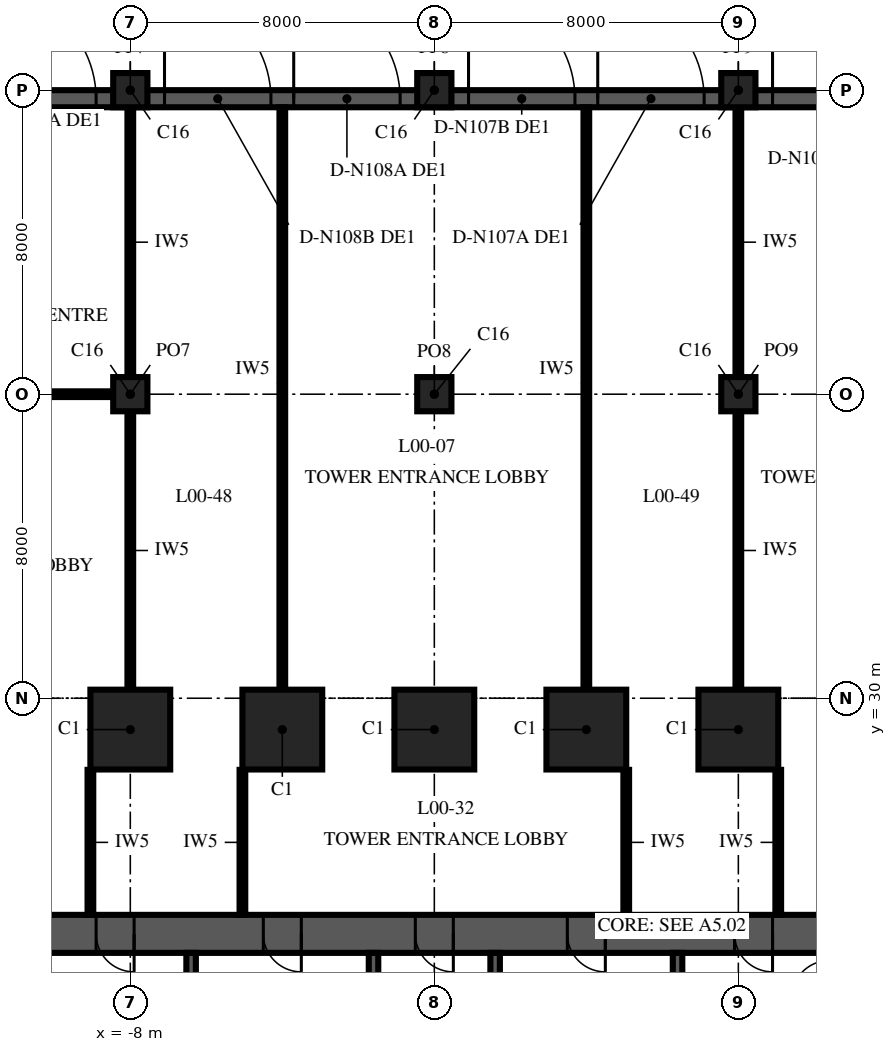
"""IFC4 building model, lengths in metres.
Left out: names, types, materials, properties, quantities, classifications, styles, units other than length and angle.
Written with IfcOpenShell. Run it as: python <this file> out.ifc"""

import sys

from ifc_helpers import new_model, si_unit, direction, frame, frame_2d, origin, origin_2d, place, context, subcontext, project, spatial, rectangle, extrude, element, fill, save


model = new_model("IFC4")
c1 = context("Model", 3, precision=1e-05, world=origin(), true_north=direction((0.0, 1.0)))
c2 = subcontext(c1, "Body", "Model", "MODEL_VIEW")
j1 = project(units=[si_unit("LENGTHUNIT", "METRE"), si_unit("PLANEANGLEUNIT", "RADIAN")], contexts=[c1])
p1 = place(None, origin())
s1 = spatial("IfcSite", under=j1, at=p1, CompositionType="ELEMENT")
p2 = place(p1, origin())
s2 = spatial("IfcBuilding", under=s1, at=p2, CompositionType="ELEMENT")
p3 = place(p2, origin())
s3 = spatial("IfcBuildingStorey", under=s2, at=p3, CompositionType="ELEMENT", Elevation=0.0)
for number, where, z_axis, x_axis in (
    (1, (8.0, 29.175, 0.0), (0.0, 0.0, 1.0), (-1.0, 0.0, 0.0)),
    (2, (4.0, 29.175, 0.0), (0.0, 0.0, 1.0), (-1.0, 0.0, 0.0)),
    (3, (0.0, 29.175, 0.0), (0.0, 0.0, 1.0), (-1.0, 0.0, 0.0)),
    (4, (-4.0, 29.175, 0.0), (0.0, 0.0, 1.0), (-1.0, 0.0, 0.0)),
    (5, (-8.0, 29.175, 0.0), (0.0, 0.0, 1.0), (-1.0, 0.0, 0.0)),
):
    element("IfcColumn", number, at=place(p3, frame(where, z_axis=z_axis, x_axis=x_axis)), inside=s3, PredefinedType="COLUMN", context=c2, shape_type="SweptSolid", body=[
        extrude(rectangle(XDim=2.1, YDim=2.1, at=origin_2d()), origin(), (0.0, 0.0, 1.0), 6.0),
    ])
for number, where, z_axis, x_axis in (
    (6, (-8.0, 38.0, 0.0), (0.0, 0.0, 1.0), (1.0, 0.0, 0.0)),
    (7, (-8.0, 46.0, 0.0), (0.0, 0.0, 1.0), (1.0, 0.0, 0.0)),
    (8, (0.0, 38.0, 0.0), (0.0, 0.0, 1.0), (1.0, 0.0, 0.0)),
    (9, (0.0, 46.0, 0.0), (0.0, 0.0, 1.0), (1.0, 0.0, 0.0)),
    (10, (8.0, 38.0, 0.0), (0.0, 0.0, 1.0), (1.0, 0.0, 0.0)),
    (11, (8.0, 46.0, 0.0), (0.0, 0.0, 1.0), (1.0, 0.0, 0.0)),
):
    element("IfcColumn", number, at=place(p3, frame(where, z_axis=z_axis, x_axis=x_axis)), inside=s3, PredefinedType="COLUMN", context=c2, shape_type="SweptSolid", body=[
        extrude(rectangle(XDim=0.9, YDim=0.9, at=origin_2d()), origin(), (0.0, 0.0, 1.0), 6.0),
    ])
p4 = place(p3, frame((13.8, 23.8, 0.0), z_axis=(0.0, 0.0, 1.0), x_axis=(-1.0, 0.0, 0.0)))
e12 = element("IfcWall", 12, at=p4, inside=s3, PredefinedType="SHEAR", context=c2, shape_type="SweptSolid", body=[
    extrude(rectangle(XDim=27.6, YDim=1.0, at=frame_2d((13.8, 0.0))), origin(), (0.0, 0.0, 1.0), 6.0),
])
p5 = place(p4, frame((21.7, 0.0, 0.0)))
e13 = element("IfcOpeningElement", 13, at=p5, cuts=e12, PredefinedType="OPENING", context=c2, shape_type="SweptSolid", body=[
    extrude(rectangle(XDim=1.0, YDim=2.1, at=frame_2d((0.5, 1.05))), frame((0.0, 0.515, 0.0), z_axis=(0.0, -1.0, 0.0), x_axis=(1.0, 0.0, 0.0)), (0.0, 0.0, 1.0), 1.03),
])
p6 = place(p4, frame((4.9, 0.0, 0.0)))
e14 = element("IfcOpeningElement", 14, at=p6, cuts=e12, PredefinedType="OPENING", context=c2, shape_type="SweptSolid", body=[
    extrude(rectangle(XDim=1.0, YDim=2.1, at=frame_2d((0.5, 1.05))), frame((0.0, 0.515, 0.0), z_axis=(0.0, -1.0, 0.0), x_axis=(1.0, 0.0, 0.0)), (0.0, 0.0, 1.0), 1.03),
])
p7 = place(p4, frame((17.3, 0.0, 0.0)))
e15 = element("IfcOpeningElement", 15, at=p7, cuts=e12, PredefinedType="OPENING", context=c2, shape_type="SweptSolid", body=[
    extrude(rectangle(XDim=1.0, YDim=2.1, at=frame_2d((0.5, 1.05))), frame((0.0, 0.515, 0.0), z_axis=(0.0, -1.0, 0.0), x_axis=(1.0, 0.0, 0.0)), (0.0, 0.0, 1.0), 1.03),
])
p8 = place(p4, frame((13.3, 0.0, 0.0)))
e16 = element("IfcOpeningElement", 16, at=p8, cuts=e12, PredefinedType="OPENING", context=c2, shape_type="SweptSolid", body=[
    extrude(rectangle(XDim=1.0, YDim=2.1, at=frame_2d((0.5, 1.05))), frame((0.0, 0.515, 0.0), z_axis=(0.0, -1.0, 0.0), x_axis=(1.0, 0.0, 0.0)), (0.0, 0.0, 1.0), 1.03),
])
p9 = place(p4, frame((9.3, 0.0, 0.0)))
e17 = element("IfcOpeningElement", 17, at=p9, cuts=e12, PredefinedType="OPENING", context=c2, shape_type="SweptSolid", body=[
    extrude(rectangle(XDim=1.0, YDim=2.1, at=frame_2d((0.5, 1.05))), frame((0.0, 0.515, 0.0), z_axis=(0.0, -1.0, 0.0), x_axis=(1.0, 0.0, 0.0)), (0.0, 0.0, 1.0), 1.03),
])
for number, where, z_axis, x_axis in (
    (18, (-6.4, 16.125, 0.0), (0.0, 0.0, 1.0), (0.0, 1.0, 0.0)),
    (19, (-1.6, 16.125, 0.0), (0.0, 0.0, 1.0), (0.0, 1.0, 0.0)),
    (20, (1.6, 16.125, 0.0), (0.0, 0.0, 1.0), (0.0, 1.0, 0.0)),
    (21, (6.4, 16.125, 0.0), (0.0, 0.0, 1.0), (0.0, 1.0, 0.0)),
):
    element("IfcWall", number, at=place(p3, frame(where, z_axis=z_axis, x_axis=x_axis)), inside=s3, PredefinedType="SHEAR", context=c2, shape_type="SweptSolid", body=[
        extrude(rectangle(XDim=7.175, YDim=0.25, at=frame_2d((3.587, 0.0))), origin(), (0.0, 0.0, 1.0), 6.0),
    ])
p10 = place(p3, frame((56.0, 45.775, 0.0), z_axis=(0.0, 0.0, 1.0), x_axis=(-1.0, 0.0, 0.0)))
e22 = element("IfcWall", 22, at=p10, inside=s3, PredefinedType="SOLIDWALL", context=c2, shape_type="SweptSolid", body=[
    extrude(rectangle(XDim=90.0, YDim=0.45, at=frame_2d((45.0, 0.0))), origin(), (0.0, 0.0, 1.0), 6.0),
])
p11 = place(p10, frame((0.9, 0.0, 0.0)))
e23 = element("IfcOpeningElement", 23, at=p11, cuts=e22, PredefinedType="OPENING", context=c2, shape_type="SweptSolid", body=[
    extrude(rectangle(XDim=2.8, YDim=2.4, at=frame_2d((1.4, 1.2))), frame((0.0, 0.24, 0.0), z_axis=(0.0, -1.0, 0.0), x_axis=(1.0, 0.0, 0.0)), (0.0, 0.0, 1.0), 0.48),
])
p12 = place(p10, frame((4.3, 0.0, 0.0)))
e24 = element("IfcOpeningElement", 24, at=p12, cuts=e22, PredefinedType="OPENING", context=c2, shape_type="SweptSolid", body=[
    extrude(rectangle(XDim=2.8, YDim=2.4, at=frame_2d((1.4, 1.2))), frame((0.0, 0.24, 0.0), z_axis=(0.0, -1.0, 0.0), x_axis=(1.0, 0.0, 0.0)), (0.0, 0.0, 1.0), 0.48),
])
p13 = place(p10, frame((8.9, 0.0, 0.0)))
e25 = element("IfcOpeningElement", 25, at=p13, cuts=e22, PredefinedType="OPENING", context=c2, shape_type="SweptSolid", body=[
    extrude(rectangle(XDim=2.8, YDim=2.4, at=frame_2d((1.4, 1.2))), frame((0.0, 0.24, 0.0), z_axis=(0.0, -1.0, 0.0), x_axis=(1.0, 0.0, 0.0)), (0.0, 0.0, 1.0), 0.48),
])
p14 = place(p10, frame((12.3, 0.0, 0.0)))
e26 = element("IfcOpeningElement", 26, at=p14, cuts=e22, PredefinedType="OPENING", context=c2, shape_type="SweptSolid", body=[
    extrude(rectangle(XDim=2.8, YDim=2.4, at=frame_2d((1.4, 1.2))), frame((0.0, 0.24, 0.0), z_axis=(0.0, -1.0, 0.0), x_axis=(1.0, 0.0, 0.0)), (0.0, 0.0, 1.0), 0.48),
])
p15 = place(p10, frame((16.9, 0.0, 0.0)))
e27 = element("IfcOpeningElement", 27, at=p15, cuts=e22, PredefinedType="OPENING", context=c2, shape_type="SweptSolid", body=[
    extrude(rectangle(XDim=2.8, YDim=2.4, at=frame_2d((1.4, 1.2))), frame((0.0, 0.24, 0.0), z_axis=(0.0, -1.0, 0.0), x_axis=(1.0, 0.0, 0.0)), (0.0, 0.0, 1.0), 0.48),
])
p16 = place(p10, frame((20.3, 0.0, 0.0)))
e28 = element("IfcOpeningElement", 28, at=p16, cuts=e22, PredefinedType="OPENING", context=c2, shape_type="SweptSolid", body=[
    extrude(rectangle(XDim=2.8, YDim=2.4, at=frame_2d((1.4, 1.2))), frame((0.0, 0.24, 0.0), z_axis=(0.0, -1.0, 0.0), x_axis=(1.0, 0.0, 0.0)), (0.0, 0.0, 1.0), 0.48),
])
p17 = place(p10, frame((24.9, 0.0, 0.0)))
e29 = element("IfcOpeningElement", 29, at=p17, cuts=e22, PredefinedType="OPENING", context=c2, shape_type="SweptSolid", body=[
    extrude(rectangle(XDim=2.8, YDim=2.4, at=frame_2d((1.4, 1.2))), frame((0.0, 0.24, 0.0), z_axis=(0.0, -1.0, 0.0), x_axis=(1.0, 0.0, 0.0)), (0.0, 0.0, 1.0), 0.48),
])
p18 = place(p10, frame((28.3, 0.0, 0.0)))
e30 = element("IfcOpeningElement", 30, at=p18, cuts=e22, PredefinedType="OPENING", context=c2, shape_type="SweptSolid", body=[
    extrude(rectangle(XDim=2.8, YDim=2.4, at=frame_2d((1.4, 1.2))), frame((0.0, 0.24, 0.0), z_axis=(0.0, -1.0, 0.0), x_axis=(1.0, 0.0, 0.0)), (0.0, 0.0, 1.0), 0.48),
])
p19 = place(p10, frame((32.9, 0.0, 0.0)))
e31 = element("IfcOpeningElement", 31, at=p19, cuts=e22, PredefinedType="OPENING", context=c2, shape_type="SweptSolid", body=[
    extrude(rectangle(XDim=2.8, YDim=2.4, at=frame_2d((1.4, 1.2))), frame((0.0, 0.24, 0.0), z_axis=(0.0, -1.0, 0.0), x_axis=(1.0, 0.0, 0.0)), (0.0, 0.0, 1.0), 0.48),
])
p20 = place(p10, frame((36.3, 0.0, 0.0)))
e32 = element("IfcOpeningElement", 32, at=p20, cuts=e22, PredefinedType="OPENING", context=c2, shape_type="SweptSolid", body=[
    extrude(rectangle(XDim=2.8, YDim=2.4, at=frame_2d((1.4, 1.2))), frame((0.0, 0.24, 0.0), z_axis=(0.0, -1.0, 0.0), x_axis=(1.0, 0.0, 0.0)), (0.0, 0.0, 1.0), 0.48),
])
p21 = place(p10, frame((40.9, 0.0, 0.0)))
e33 = element("IfcOpeningElement", 33, at=p21, cuts=e22, PredefinedType="OPENING", context=c2, shape_type="SweptSolid", body=[
    extrude(rectangle(XDim=2.8, YDim=2.4, at=frame_2d((1.4, 1.2))), frame((0.0, 0.24, 0.0), z_axis=(0.0, -1.0, 0.0), x_axis=(1.0, 0.0, 0.0)), (0.0, 0.0, 1.0), 0.48),
])
p22 = place(p10, frame((44.3, 0.0, 0.0)))
e34 = element("IfcOpeningElement", 34, at=p22, cuts=e22, PredefinedType="OPENING", context=c2, shape_type="SweptSolid", body=[
    extrude(rectangle(XDim=2.8, YDim=2.4, at=frame_2d((1.4, 1.2))), frame((0.0, 0.24, 0.0), z_axis=(0.0, -1.0, 0.0), x_axis=(1.0, 0.0, 0.0)), (0.0, 0.0, 1.0), 0.48),
])
p23 = place(p10, frame((48.9, 0.0, 0.0)))
e35 = element("IfcOpeningElement", 35, at=p23, cuts=e22, PredefinedType="OPENING", context=c2, shape_type="SweptSolid", body=[
    extrude(rectangle(XDim=2.8, YDim=2.4, at=frame_2d((1.4, 1.2))), frame((0.0, 0.24, 0.0), z_axis=(0.0, -1.0, 0.0), x_axis=(1.0, 0.0, 0.0)), (0.0, 0.0, 1.0), 0.48),
])
p24 = place(p10, frame((52.3, 0.0, 0.0)))
e36 = element("IfcOpeningElement", 36, at=p24, cuts=e22, PredefinedType="OPENING", context=c2, shape_type="SweptSolid", body=[
    extrude(rectangle(XDim=2.8, YDim=2.4, at=frame_2d((1.4, 1.2))), frame((0.0, 0.24, 0.0), z_axis=(0.0, -1.0, 0.0), x_axis=(1.0, 0.0, 0.0)), (0.0, 0.0, 1.0), 0.48),
])
p25 = place(p10, frame((56.9, 0.0, 0.0)))
e37 = element("IfcOpeningElement", 37, at=p25, cuts=e22, PredefinedType="OPENING", context=c2, shape_type="SweptSolid", body=[
    extrude(rectangle(XDim=2.8, YDim=2.4, at=frame_2d((1.4, 1.2))), frame((0.0, 0.24, 0.0), z_axis=(0.0, -1.0, 0.0), x_axis=(1.0, 0.0, 0.0)), (0.0, 0.0, 1.0), 0.48),
])
p26 = place(p10, frame((60.3, 0.0, 0.0)))
e38 = element("IfcOpeningElement", 38, at=p26, cuts=e22, PredefinedType="OPENING", context=c2, shape_type="SweptSolid", body=[
    extrude(rectangle(XDim=2.8, YDim=2.4, at=frame_2d((1.4, 1.2))), frame((0.0, 0.24, 0.0), z_axis=(0.0, -1.0, 0.0), x_axis=(1.0, 0.0, 0.0)), (0.0, 0.0, 1.0), 0.48),
])
p27 = place(p10, frame((64.9, 0.0, 0.0)))
e39 = element("IfcOpeningElement", 39, at=p27, cuts=e22, PredefinedType="OPENING", context=c2, shape_type="SweptSolid", body=[
    extrude(rectangle(XDim=2.8, YDim=2.4, at=frame_2d((1.4, 1.2))), frame((0.0, 0.24, 0.0), z_axis=(0.0, -1.0, 0.0), x_axis=(1.0, 0.0, 0.0)), (0.0, 0.0, 1.0), 0.48),
])
p28 = place(p10, frame((68.3, 0.0, 0.0)))
e40 = element("IfcOpeningElement", 40, at=p28, cuts=e22, PredefinedType="OPENING", context=c2, shape_type="SweptSolid", body=[
    extrude(rectangle(XDim=2.8, YDim=2.4, at=frame_2d((1.4, 1.2))), frame((0.0, 0.24, 0.0), z_axis=(0.0, -1.0, 0.0), x_axis=(1.0, 0.0, 0.0)), (0.0, 0.0, 1.0), 0.48),
])
p29 = place(p10, frame((72.9, 0.0, 0.0)))
e41 = element("IfcOpeningElement", 41, at=p29, cuts=e22, PredefinedType="OPENING", context=c2, shape_type="SweptSolid", body=[
    extrude(rectangle(XDim=2.8, YDim=2.4, at=frame_2d((1.4, 1.2))), frame((0.0, 0.24, 0.0), z_axis=(0.0, -1.0, 0.0), x_axis=(1.0, 0.0, 0.0)), (0.0, 0.0, 1.0), 0.48),
])
p30 = place(p10, frame((76.3, 0.0, 0.0)))
e42 = element("IfcOpeningElement", 42, at=p30, cuts=e22, PredefinedType="OPENING", context=c2, shape_type="SweptSolid", body=[
    extrude(rectangle(XDim=2.8, YDim=2.4, at=frame_2d((1.4, 1.2))), frame((0.0, 0.24, 0.0), z_axis=(0.0, -1.0, 0.0), x_axis=(1.0, 0.0, 0.0)), (0.0, 0.0, 1.0), 0.48),
])
p31 = place(p10, frame((80.9, 0.0, 0.0)))
e43 = element("IfcOpeningElement", 43, at=p31, cuts=e22, PredefinedType="OPENING", context=c2, shape_type="SweptSolid", body=[
    extrude(rectangle(XDim=2.8, YDim=2.4, at=frame_2d((1.4, 1.2))), frame((0.0, 0.24, 0.0), z_axis=(0.0, -1.0, 0.0), x_axis=(1.0, 0.0, 0.0)), (0.0, 0.0, 1.0), 0.48),
])
p32 = place(p10, frame((84.3, 0.0, 0.0)))
e44 = element("IfcOpeningElement", 44, at=p32, cuts=e22, PredefinedType="OPENING", context=c2, shape_type="SweptSolid", body=[
    extrude(rectangle(XDim=2.8, YDim=2.4, at=frame_2d((1.4, 1.2))), frame((0.0, 0.24, 0.0), z_axis=(0.0, -1.0, 0.0), x_axis=(1.0, 0.0, 0.0)), (0.0, 0.0, 1.0), 0.48),
])
p33 = place(p3, frame((-15.54, 38.0, 0.0), z_axis=(0.0, 0.0, 1.0), x_axis=(1.0, 0.0, 0.0)))
e45 = element("IfcWall", 45, at=p33, inside=s3, PredefinedType="PARTITIONING", context=c2, shape_type="SweptSolid", body=[
    extrude(rectangle(XDim=7.08, YDim=0.15, at=frame_2d((3.54, 0.0))), origin(), (0.0, 0.0, 1.0), 5.05),
])
for number, where, z_axis, x_axis in (
    (46, (-9.05, 24.3, 0.0), (0.0, 0.0, 1.0), (0.0, 1.0, 0.0)),
    (47, (-5.05, 24.3, 0.0), (0.0, 0.0, 1.0), (0.0, 1.0, 0.0)),
):
    element("IfcWall", number, at=place(p3, frame(where, z_axis=z_axis, x_axis=x_axis)), inside=s3, PredefinedType="PARTITIONING", context=c2, shape_type="SweptSolid", body=[
        extrude(rectangle(XDim=3.815, YDim=0.15, at=frame_2d((1.907, 0.0))), origin(), (0.0, 0.0, 1.0), 5.7),
    ])
p34 = place(p3, frame((-8.0, 30.235, 0.0), z_axis=(0.0, 0.0, 1.0), x_axis=(0.0, 1.0, 0.0)))
e48 = element("IfcWall", 48, at=p34, inside=s3, PredefinedType="PARTITIONING", context=c2, shape_type="SweptSolid", body=[
    extrude(rectangle(XDim=7.305, YDim=0.15, at=frame_2d((3.652, 0.0))), origin(), (0.0, 0.0, 1.0), 5.7),
])
p35 = place(p3, frame((-8.0, 38.46, 0.0), z_axis=(0.0, 0.0, 1.0), x_axis=(0.0, 1.0, 0.0)))
e49 = element("IfcWall", 49, at=p35, inside=s3, PredefinedType="PARTITIONING", context=c2, shape_type="SweptSolid", body=[
    extrude(rectangle(XDim=7.08, YDim=0.15, at=frame_2d((3.54, 0.0))), origin(), (0.0, 0.0, 1.0), 5.05),
])
p36 = place(p3, frame((-4.0, 30.235, 0.0), z_axis=(0.0, 0.0, 1.0), x_axis=(0.0, 1.0, 0.0)))
e50 = element("IfcWall", 50, at=p36, inside=s3, PredefinedType="PARTITIONING", context=c2, shape_type="SweptSolid", body=[
    extrude(rectangle(XDim=15.315, YDim=0.15, at=frame_2d((7.657, 0.0))), origin(), (0.0, 0.0, 1.0), 5.7),
])
for number, where, z_axis, x_axis in (
    (51, (9.05, 24.3, 0.0), (0.0, 0.0, 1.0), (0.0, 1.0, 0.0)),
    (52, (5.05, 24.3, 0.0), (0.0, 0.0, 1.0), (0.0, 1.0, 0.0)),
):
    element("IfcWall", number, at=place(p3, frame(where, z_axis=z_axis, x_axis=x_axis)), inside=s3, PredefinedType="PARTITIONING", context=c2, shape_type="SweptSolid", body=[
        extrude(rectangle(XDim=3.815, YDim=0.15, at=frame_2d((1.907, 0.0))), origin(), (0.0, 0.0, 1.0), 5.7),
    ])
p37 = place(p3, frame((8.0, 30.235, 0.0), z_axis=(0.0, 0.0, 1.0), x_axis=(0.0, 1.0, 0.0)))
e53 = element("IfcWall", 53, at=p37, inside=s3, PredefinedType="PARTITIONING", context=c2, shape_type="SweptSolid", body=[
    extrude(rectangle(XDim=7.305, YDim=0.15, at=frame_2d((3.652, 0.0))), origin(), (0.0, 0.0, 1.0), 5.7),
])
p38 = place(p3, frame((8.0, 38.46, 0.0), z_axis=(0.0, 0.0, 1.0), x_axis=(0.0, 1.0, 0.0)))
e54 = element("IfcWall", 54, at=p38, inside=s3, PredefinedType="PARTITIONING", context=c2, shape_type="SweptSolid", body=[
    extrude(rectangle(XDim=7.08, YDim=0.15, at=frame_2d((3.54, 0.0))), origin(), (0.0, 0.0, 1.0), 5.05),
])
p39 = place(p3, frame((4.0, 30.235, 0.0), z_axis=(0.0, 0.0, 1.0), x_axis=(0.0, 1.0, 0.0)))
e55 = element("IfcWall", 55, at=p39, inside=s3, PredefinedType="PARTITIONING", context=c2, shape_type="SweptSolid", body=[
    extrude(rectangle(XDim=15.315, YDim=0.15, at=frame_2d((7.657, 0.0))), origin(), (0.0, 0.0, 1.0), 5.7),
])
p40 = place(p22, frame((2.8, 0.0, 0.0), z_axis=(0.0, 0.0, 1.0), x_axis=(-1.0, 0.0, 0.0)))
e56 = element("IfcDoor", 56, at=p40, inside=s3, OperationType="DOUBLE_DOOR_SINGLE_SWING", PredefinedType="DOOR", context=c2, shape_type="SweptSolid", body=[
    extrude(rectangle(XDim=2.8, YDim=2.4, at=frame_2d((1.4, 1.2))), frame((0.0, 0.225, 0.0), z_axis=(0.0, -1.0, 0.0), x_axis=(1.0, 0.0, 0.0)), (0.0, 0.0, 1.0), 0.449),
])
fill(e34, e56)
p41 = place(p23, frame((2.8, 0.0, 0.0), z_axis=(0.0, 0.0, 1.0), x_axis=(-1.0, 0.0, 0.0)))
e57 = element("IfcDoor", 57, at=p41, inside=s3, OperationType="DOUBLE_DOOR_SINGLE_SWING", PredefinedType="DOOR", context=c2, shape_type="SweptSolid", body=[
    extrude(rectangle(XDim=2.8, YDim=2.4, at=frame_2d((1.4, 1.2))), frame((0.0, 0.225, 0.0), z_axis=(0.0, -1.0, 0.0), x_axis=(1.0, 0.0, 0.0)), (0.0, 0.0, 1.0), 0.449),
])
fill(e35, e57)
p42 = place(p24, frame((2.8, 0.0, 0.0), z_axis=(0.0, 0.0, 1.0), x_axis=(-1.0, 0.0, 0.0)))
e58 = element("IfcDoor", 58, at=p42, inside=s3, OperationType="DOUBLE_DOOR_SINGLE_SWING", PredefinedType="DOOR", context=c2, shape_type="SweptSolid", body=[
    extrude(rectangle(XDim=2.8, YDim=2.4, at=frame_2d((1.4, 1.2))), frame((0.0, 0.225, 0.0), z_axis=(0.0, -1.0, 0.0), x_axis=(1.0, 0.0, 0.0)), (0.0, 0.0, 1.0), 0.449),
])
fill(e36, e58)
p43 = place(p25, frame((2.8, 0.0, 0.0), z_axis=(0.0, 0.0, 1.0), x_axis=(-1.0, 0.0, 0.0)))
e59 = element("IfcDoor", 59, at=p43, inside=s3, OperationType="DOUBLE_DOOR_SINGLE_SWING", PredefinedType="DOOR", context=c2, shape_type="SweptSolid", body=[
    extrude(rectangle(XDim=2.8, YDim=2.4, at=frame_2d((1.4, 1.2))), frame((0.0, 0.225, 0.0), z_axis=(0.0, -1.0, 0.0), x_axis=(1.0, 0.0, 0.0)), (0.0, 0.0, 1.0), 0.449),
])
fill(e37, e59)
p44 = place(p26, frame((2.8, 0.0, 0.0), z_axis=(0.0, 0.0, 1.0), x_axis=(-1.0, 0.0, 0.0)))
e60 = element("IfcDoor", 60, at=p44, inside=s3, OperationType="DOUBLE_DOOR_SINGLE_SWING", PredefinedType="DOOR", context=c2, shape_type="SweptSolid", body=[
    extrude(rectangle(XDim=2.8, YDim=2.4, at=frame_2d((1.4, 1.2))), frame((0.0, 0.225, 0.0), z_axis=(0.0, -1.0, 0.0), x_axis=(1.0, 0.0, 0.0)), (0.0, 0.0, 1.0), 0.449),
])
fill(e38, e60)
p45 = place(p27, frame((2.8, 0.0, 0.0), z_axis=(0.0, 0.0, 1.0), x_axis=(-1.0, 0.0, 0.0)))
e61 = element("IfcDoor", 61, at=p45, inside=s3, OperationType="DOUBLE_DOOR_SINGLE_SWING", PredefinedType="DOOR", context=c2, shape_type="SweptSolid", body=[
    extrude(rectangle(XDim=2.8, YDim=2.4, at=frame_2d((1.4, 1.2))), frame((0.0, 0.225, 0.0), z_axis=(0.0, -1.0, 0.0), x_axis=(1.0, 0.0, 0.0)), (0.0, 0.0, 1.0), 0.449),
])
fill(e39, e61)
p46 = place(p5, origin())
e62 = element("IfcDoor", 62, at=p46, inside=s3, OperationType="SINGLE_SWING_RIGHT", PredefinedType="DOOR", context=c2, shape_type="SweptSolid", body=[
    extrude(rectangle(XDim=1.0, YDim=2.1, at=frame_2d((0.5, 1.05))), frame((0.0, 0.5, 0.0), z_axis=(0.0, -1.0, 0.0), x_axis=(1.0, 0.0, 0.0)), (0.0, 0.0, 1.0), 1.0),
])
fill(e13, e62)
p47 = place(p6, origin())
e63 = element("IfcDoor", 63, at=p47, inside=s3, OperationType="SINGLE_SWING_RIGHT", PredefinedType="DOOR", context=c2, shape_type="SweptSolid", body=[
    extrude(rectangle(XDim=1.0, YDim=2.1, at=frame_2d((0.5, 1.05))), frame((0.0, 0.5, 0.0), z_axis=(0.0, -1.0, 0.0), x_axis=(1.0, 0.0, 0.0)), (0.0, 0.0, 1.0), 1.0),
])
fill(e14, e63)
p48 = place(p7, origin())
e64 = element("IfcDoor", 64, at=p48, inside=s3, OperationType="SINGLE_SWING_LEFT", PredefinedType="DOOR", context=c2, shape_type="SweptSolid", body=[
    extrude(rectangle(XDim=1.0, YDim=2.1, at=frame_2d((0.5, 1.05))), frame((0.0, 0.5, 0.0), z_axis=(0.0, -1.0, 0.0), x_axis=(1.0, 0.0, 0.0)), (0.0, 0.0, 1.0), 1.0),
])
fill(e15, e64)
p49 = place(p8, origin())
e65 = element("IfcDoor", 65, at=p49, inside=s3, OperationType="SINGLE_SWING_LEFT", PredefinedType="DOOR", context=c2, shape_type="SweptSolid", body=[
    extrude(rectangle(XDim=1.0, YDim=2.1, at=frame_2d((0.5, 1.05))), frame((0.0, 0.5, 0.0), z_axis=(0.0, -1.0, 0.0), x_axis=(1.0, 0.0, 0.0)), (0.0, 0.0, 1.0), 1.0),
])
fill(e16, e65)
p50 = place(p9, origin())
e66 = element("IfcDoor", 66, at=p50, inside=s3, OperationType="SINGLE_SWING_LEFT", PredefinedType="DOOR", context=c2, shape_type="SweptSolid", body=[
    extrude(rectangle(XDim=1.0, YDim=2.1, at=frame_2d((0.5, 1.05))), frame((0.0, 0.5, 0.0), z_axis=(0.0, -1.0, 0.0), x_axis=(1.0, 0.0, 0.0)), (0.0, 0.0, 1.0), 1.0),
])
fill(e17, e66)
save(model, sys.argv[1])
